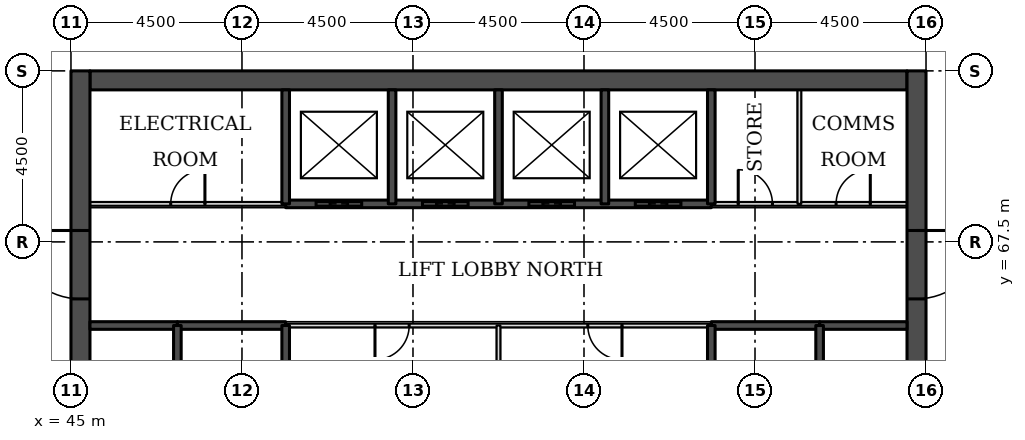
"""IFC4 building model, lengths in metres.
Left out: names, types, materials, properties, quantities, classifications, styles, units other than length and angle.
Written with IfcOpenShell. Run it as: python <this file> out.ifc"""

import sys

from ifc_helpers import new_model, si_unit, direction, frame, frame_2d, origin, place, context, subcontext, project, spatial, rectangle, extrude, element, fill, save


model = new_model("IFC4")
c1 = context("Model", 3, precision=1e-05, world=origin(), true_north=direction((0.0, 1.0)))
c2 = subcontext(c1, "Body", "Model", "MODEL_VIEW")
j1 = project(units=[si_unit("LENGTHUNIT", "METRE"), si_unit("PLANEANGLEUNIT", "RADIAN")], contexts=[c1])
p1 = place(None, origin())
s1 = spatial("IfcSite", under=j1, at=p1, CompositionType="ELEMENT")
p2 = place(p1, origin())
s2 = spatial("IfcBuilding", under=s1, at=p2, CompositionType="ELEMENT")
p3 = place(p2, frame((0.0, 0.0, -9.0)))
s3 = spatial("IfcBuildingStorey", under=s2, at=p3, CompositionType="ELEMENT", Elevation=-9.0)
p4 = place(p3, frame((45.5, 71.75, 0.0), z_axis=(0.0, 0.0, 1.0), x_axis=(1.0, 0.0, 0.0)))
e1 = element("IfcWall", 1, at=p4, inside=s3, PredefinedType="SHEAR", context=c2, shape_type="SweptSolid", body=[
    extrude(rectangle(XDim=21.5, YDim=0.5, at=frame_2d((10.75, 0.0))), origin(), (0.0, 0.0, 1.0), 4.5),
])
p5 = place(p3, frame((45.25, 49.5, 0.0), z_axis=(0.0, 0.0, 1.0), x_axis=(0.0, 1.0, 0.0)))
e2 = element("IfcWall", 2, at=p5, inside=s3, PredefinedType="SHEAR", context=c2, shape_type="SweptSolid", body=[
    extrude(rectangle(XDim=22.5, YDim=0.5, at=frame_2d((11.25, 0.0))), origin(), (0.0, 0.0, 1.0), 4.5),
])
p6 = place(p5, frame((4.2, 0.0, 0.0)))
e3 = element("IfcOpeningElement", 3, at=p6, cuts=e2, PredefinedType="OPENING", context=c2, shape_type="SweptSolid", body=[
    extrude(rectangle(XDim=1.8, YDim=2.1, at=frame_2d((0.9, 1.05))), frame((0.0, 0.26, 0.0), z_axis=(0.0, -1.0, 0.0), x_axis=(1.0, 0.0, 0.0)), (0.0, 0.0, 1.0), 0.52),
])
p7 = place(p5, frame((6.9, 0.0, 0.0)))
e4 = element("IfcOpeningElement", 4, at=p7, cuts=e2, PredefinedType="OPENING", context=c2, shape_type="SweptSolid", body=[
    extrude(rectangle(XDim=1.1, YDim=2.1, at=frame_2d((0.55, 1.05))), frame((0.0, 0.26, 0.0), z_axis=(0.0, -1.0, 0.0), x_axis=(1.0, 0.0, 0.0)), (0.0, 0.0, 1.0), 0.52),
])
p8 = place(p5, frame((13.6, 0.0, 0.0)))
e5 = element("IfcOpeningElement", 5, at=p8, cuts=e2, PredefinedType="OPENING", context=c2, shape_type="SweptSolid", body=[
    extrude(rectangle(XDim=1.1, YDim=2.1, at=frame_2d((0.55, 1.05))), frame((0.0, 0.26, 0.0), z_axis=(0.0, -1.0, 0.0), x_axis=(1.0, 0.0, 0.0)), (0.0, 0.0, 1.0), 0.52),
])
p9 = place(p5, frame((16.5, 0.0, 0.0)))
e6 = element("IfcOpeningElement", 6, at=p9, cuts=e2, PredefinedType="OPENING", context=c2, shape_type="SweptSolid", body=[
    extrude(rectangle(XDim=1.8, YDim=2.1, at=frame_2d((0.9, 1.05))), frame((0.0, 0.26, 0.0), z_axis=(0.0, -1.0, 0.0), x_axis=(1.0, 0.0, 0.0)), (0.0, 0.0, 1.0), 0.52),
])
p10 = place(p3, frame((67.25, 49.5, 0.0), z_axis=(0.0, 0.0, 1.0), x_axis=(0.0, 1.0, 0.0)))
e7 = element("IfcWall", 7, at=p10, inside=s3, PredefinedType="SHEAR", context=c2, shape_type="SweptSolid", body=[
    extrude(rectangle(XDim=22.5, YDim=0.5, at=frame_2d((11.25, 0.0))), origin(), (0.0, 0.0, 1.0), 4.5),
])
p11 = place(p10, frame((4.2, 0.0, 0.0)))
e8 = element("IfcOpeningElement", 8, at=p11, cuts=e7, PredefinedType="OPENING", context=c2, shape_type="SweptSolid", body=[
    extrude(rectangle(XDim=1.8, YDim=2.1, at=frame_2d((0.9, 1.05))), frame((0.0, 0.26, 0.0), z_axis=(0.0, -1.0, 0.0), x_axis=(1.0, 0.0, 0.0)), (0.0, 0.0, 1.0), 0.52),
])
p12 = place(p10, frame((6.9, 0.0, 0.0)))
e9 = element("IfcOpeningElement", 9, at=p12, cuts=e7, PredefinedType="OPENING", context=c2, shape_type="SweptSolid", body=[
    extrude(rectangle(XDim=1.1, YDim=2.1, at=frame_2d((0.55, 1.05))), frame((0.0, 0.26, 0.0), z_axis=(0.0, -1.0, 0.0), x_axis=(1.0, 0.0, 0.0)), (0.0, 0.0, 1.0), 0.52),
])
p13 = place(p10, frame((13.6, 0.0, 0.0)))
e10 = element("IfcOpeningElement", 10, at=p13, cuts=e7, PredefinedType="OPENING", context=c2, shape_type="SweptSolid", body=[
    extrude(rectangle(XDim=1.1, YDim=2.1, at=frame_2d((0.55, 1.05))), frame((0.0, 0.26, 0.0), z_axis=(0.0, -1.0, 0.0), x_axis=(1.0, 0.0, 0.0)), (0.0, 0.0, 1.0), 0.52),
])
p14 = place(p10, frame((16.5, 0.0, 0.0)))
e11 = element("IfcOpeningElement", 11, at=p14, cuts=e7, PredefinedType="OPENING", context=c2, shape_type="SweptSolid", body=[
    extrude(rectangle(XDim=1.8, YDim=2.1, at=frame_2d((0.9, 1.05))), frame((0.0, 0.26, 0.0), z_axis=(0.0, -1.0, 0.0), x_axis=(1.0, 0.0, 0.0)), (0.0, 0.0, 1.0), 0.52),
])
p15 = place(p3, frame((50.65, 65.3, 0.0), z_axis=(0.0, 0.0, 1.0), x_axis=(1.0, 0.0, 0.0)))
e12 = element("IfcWall", 12, at=p15, inside=s3, PredefinedType="PARTITIONING", context=c2, shape_type="SweptSolid", body=[
    extrude(rectangle(XDim=11.2, YDim=0.1, at=frame_2d((5.6, 0.0))), origin(), (0.0, 0.0, 1.0), 4.1),
])
p16 = place(p15, frame((2.35, 0.0, 0.0)))
e13 = element("IfcOpeningElement", 13, at=p16, cuts=e12, PredefinedType="OPENING", context=c2, shape_type="SweptSolid", body=[
    extrude(rectangle(XDim=0.9, YDim=2.1, at=frame_2d((0.45, 1.05))), frame((0.0, 0.06, 0.0), z_axis=(0.0, -1.0, 0.0), x_axis=(1.0, 0.0, 0.0)), (0.0, 0.0, 1.0), 0.12),
])
p17 = place(p15, frame((7.95, 0.0, 0.0)))
e14 = element("IfcOpeningElement", 14, at=p17, cuts=e12, PredefinedType="OPENING", context=c2, shape_type="SweptSolid", body=[
    extrude(rectangle(XDim=0.9, YDim=2.1, at=frame_2d((0.45, 1.05))), frame((0.0, 0.06, 0.0), z_axis=(0.0, -1.0, 0.0), x_axis=(1.0, 0.0, 0.0)), (0.0, 0.0, 1.0), 0.12),
])
for number, where, z_axis, x_axis in (
    (15, (45.5, 65.3, 0.0), (0.0, 0.0, 1.0), (1.0, 0.0, 0.0)),
    (16, (64.7, 65.3, 0.0), (0.0, 0.0, 1.0), (1.0, 0.0, 0.0)),
):
    element("IfcWall", number, at=place(p3, frame(where, z_axis=z_axis, x_axis=x_axis)), inside=s3, PredefinedType="SOLIDWALL", context=c2, shape_type="SweptSolid", body=[
        extrude(rectangle(XDim=2.3, YDim=0.2, at=frame_2d((1.15, 0.0))), origin(), (0.0, 0.0, 1.0), 4.1),
    ])
for number, where, z_axis, x_axis in (
    (17, (47.8, 65.3, 0.0), (0.0, 0.0, 1.0), (1.0, 0.0, 0.0)),
    (18, (61.85, 65.3, 0.0), (0.0, 0.0, 1.0), (1.0, 0.0, 0.0)),
):
    element("IfcWall", number, at=place(p3, frame(where, z_axis=z_axis, x_axis=x_axis)), inside=s3, PredefinedType="SOLIDWALL", context=c2, shape_type="SweptSolid", body=[
        extrude(rectangle(XDim=2.85, YDim=0.2, at=frame_2d((1.425, 0.0))), origin(), (0.0, 0.0, 1.0), 4.1),
    ])
p18 = place(p3, frame((45.5, 68.5, 0.0), z_axis=(0.0, 0.0, 1.0), x_axis=(1.0, 0.0, 0.0)))
e19 = element("IfcWall", 19, at=p18, inside=s3, PredefinedType="PARTITIONING", context=c2, shape_type="SweptSolid", body=[
    extrude(rectangle(XDim=5.15, YDim=0.1, at=frame_2d((2.575, 0.0))), origin(), (0.0, 0.0, 1.0), 4.1),
])
p19 = place(p18, frame((2.125, 0.0, 0.0)))
e20 = element("IfcOpeningElement", 20, at=p19, cuts=e19, PredefinedType="OPENING", context=c2, shape_type="SweptSolid", body=[
    extrude(rectangle(XDim=0.9, YDim=2.1, at=frame_2d((0.45, 1.05))), frame((0.0, 0.06, 0.0), z_axis=(0.0, -1.0, 0.0), x_axis=(1.0, 0.0, 0.0)), (0.0, 0.0, 1.0), 0.12),
])
p20 = place(p3, frame((61.85, 68.5, 0.0), z_axis=(0.0, 0.0, 1.0), x_axis=(1.0, 0.0, 0.0)))
e21 = element("IfcWall", 21, at=p20, inside=s3, PredefinedType="PARTITIONING", context=c2, shape_type="SweptSolid", body=[
    extrude(rectangle(XDim=5.15, YDim=0.1, at=frame_2d((2.575, 0.0))), origin(), (0.0, 0.0, 1.0), 4.1),
])
p21 = place(p20, frame((3.284, 0.0, 0.0)))
e22 = element("IfcOpeningElement", 22, at=p21, cuts=e21, PredefinedType="OPENING", context=c2, shape_type="SweptSolid", body=[
    extrude(rectangle(XDim=0.9, YDim=2.1, at=frame_2d((0.45, 1.05))), frame((0.0, 0.06, 0.0), z_axis=(0.0, -1.0, 0.0), x_axis=(1.0, 0.0, 0.0)), (0.0, 0.0, 1.0), 0.12),
])
p22 = place(p20, frame((0.709, 0.0, 0.0)))
e23 = element("IfcOpeningElement", 23, at=p22, cuts=e21, PredefinedType="OPENING", context=c2, shape_type="SweptSolid", body=[
    extrude(rectangle(XDim=0.9, YDim=2.1, at=frame_2d((0.45, 1.05))), frame((0.0, 0.06, 0.0), z_axis=(0.0, -1.0, 0.0), x_axis=(1.0, 0.0, 0.0)), (0.0, 0.0, 1.0), 0.12),
])
p23 = place(p3, frame((50.65, 68.5, 0.0), z_axis=(0.0, 0.0, 1.0), x_axis=(1.0, 0.0, 0.0)))
e24 = element("IfcWall", 24, at=p23, inside=s3, PredefinedType="SOLIDWALL", context=c2, shape_type="SweptSolid", body=[
    extrude(rectangle(XDim=11.2, YDim=0.2, at=frame_2d((5.6, 0.0))), origin(), (0.0, 0.0, 1.0), 4.1),
])
p24 = place(p23, frame((0.8, 0.0, 0.0)))
e25 = element("IfcOpeningElement", 25, at=p24, cuts=e24, PredefinedType="OPENING", context=c2, shape_type="SweptSolid", body=[
    extrude(rectangle(XDim=1.2, YDim=2.1, at=frame_2d((0.6, 1.05))), frame((0.0, 0.11, 0.0), z_axis=(0.0, -1.0, 0.0), x_axis=(1.0, 0.0, 0.0)), (0.0, 0.0, 1.0), 0.22),
])
p25 = place(p23, frame((3.6, 0.0, 0.0)))
e26 = element("IfcOpeningElement", 26, at=p25, cuts=e24, PredefinedType="OPENING", context=c2, shape_type="SweptSolid", body=[
    extrude(rectangle(XDim=1.2, YDim=2.1, at=frame_2d((0.6, 1.05))), frame((0.0, 0.11, 0.0), z_axis=(0.0, -1.0, 0.0), x_axis=(1.0, 0.0, 0.0)), (0.0, 0.0, 1.0), 0.22),
])
p26 = place(p23, frame((6.4, 0.0, 0.0)))
e27 = element("IfcOpeningElement", 27, at=p26, cuts=e24, PredefinedType="OPENING", context=c2, shape_type="SweptSolid", body=[
    extrude(rectangle(XDim=1.2, YDim=2.1, at=frame_2d((0.6, 1.05))), frame((0.0, 0.11, 0.0), z_axis=(0.0, -1.0, 0.0), x_axis=(1.0, 0.0, 0.0)), (0.0, 0.0, 1.0), 0.22),
])
p27 = place(p23, frame((9.2, 0.0, 0.0)))
e28 = element("IfcOpeningElement", 28, at=p27, cuts=e24, PredefinedType="OPENING", context=c2, shape_type="SweptSolid", body=[
    extrude(rectangle(XDim=1.2, YDim=2.1, at=frame_2d((0.6, 1.05))), frame((0.0, 0.11, 0.0), z_axis=(0.0, -1.0, 0.0), x_axis=(1.0, 0.0, 0.0)), (0.0, 0.0, 1.0), 0.22),
])
p28 = place(p3, frame((47.8, 62.0, 0.0), z_axis=(0.0, 0.0, 1.0), x_axis=(0.0, 1.0, 0.0)))
e29 = element("IfcWall", 29, at=p28, inside=s3, PredefinedType="SOLIDWALL", context=c2, shape_type="SweptSolid", body=[
    extrude(rectangle(XDim=3.3, YDim=0.2, at=frame_2d((1.65, 0.0))), origin(), (0.0, 0.0, 1.0), 4.1),
])
p29 = place(p28, frame((1.1, 0.0, 0.0)))
e30 = element("IfcOpeningElement", 30, at=p29, cuts=e29, PredefinedType="OPENING", context=c2, shape_type="SweptSolid", body=[
    extrude(rectangle(XDim=1.1, YDim=2.1, at=frame_2d((0.55, 1.05))), frame((0.0, 0.11, 0.0), z_axis=(0.0, -1.0, 0.0), x_axis=(1.0, 0.0, 0.0)), (0.0, 0.0, 1.0), 0.22),
])
p30 = place(p3, frame((50.65, 62.0, 0.0), z_axis=(0.0, 0.0, 1.0), x_axis=(0.0, 1.0, 0.0)))
e31 = element("IfcWall", 31, at=p30, inside=s3, PredefinedType="SOLIDWALL", context=c2, shape_type="SweptSolid", body=[
    extrude(rectangle(XDim=3.3, YDim=0.2, at=frame_2d((1.65, 0.0))), origin(), (0.0, 0.0, 1.0), 4.1),
])
for number, where, z_axis, x_axis in (
    (32, (50.65, 68.5, 0.0), (0.0, 0.0, 1.0), (0.0, 1.0, 0.0)),
    (33, (53.45, 68.5, 0.0), (0.0, 0.0, 1.0), (0.0, 1.0, 0.0)),
):
    element("IfcWall", number, at=place(p3, frame(where, z_axis=z_axis, x_axis=x_axis)), inside=s3, PredefinedType="SOLIDWALL", context=c2, shape_type="SweptSolid", body=[
        extrude(rectangle(XDim=3.0, YDim=0.2, at=frame_2d((1.5, 0.0))), origin(), (0.0, 0.0, 1.0), 4.1),
    ])
p31 = place(p3, frame((56.25, 62.5, 0.0), z_axis=(0.0, 0.0, 1.0), x_axis=(0.0, 1.0, 0.0)))
e34 = element("IfcWall", 34, at=p31, inside=s3, PredefinedType="PARTITIONING", context=c2, shape_type="SweptSolid", body=[
    extrude(rectangle(XDim=2.8, YDim=0.1, at=frame_2d((1.4, 0.0))), origin(), (0.0, 0.0, 1.0), 4.1),
])
for number, where, z_axis, x_axis in (
    (35, (56.25, 68.5, 0.0), (0.0, 0.0, 1.0), (0.0, 1.0, 0.0)),
    (36, (59.05, 68.5, 0.0), (0.0, 0.0, 1.0), (0.0, 1.0, 0.0)),
):
    element("IfcWall", number, at=place(p3, frame(where, z_axis=z_axis, x_axis=x_axis)), inside=s3, PredefinedType="SOLIDWALL", context=c2, shape_type="SweptSolid", body=[
        extrude(rectangle(XDim=3.0, YDim=0.2, at=frame_2d((1.5, 0.0))), origin(), (0.0, 0.0, 1.0), 4.1),
    ])
p32 = place(p3, frame((61.85, 62.0, 0.0), z_axis=(0.0, 0.0, 1.0), x_axis=(0.0, 1.0, 0.0)))
e37 = element("IfcWall", 37, at=p32, inside=s3, PredefinedType="SOLIDWALL", context=c2, shape_type="SweptSolid", body=[
    extrude(rectangle(XDim=3.3, YDim=0.2, at=frame_2d((1.65, 0.0))), origin(), (0.0, 0.0, 1.0), 4.1),
])
p33 = place(p3, frame((61.85, 68.5, 0.0), z_axis=(0.0, 0.0, 1.0), x_axis=(0.0, 1.0, 0.0)))
e38 = element("IfcWall", 38, at=p33, inside=s3, PredefinedType="SOLIDWALL", context=c2, shape_type="SweptSolid", body=[
    extrude(rectangle(XDim=3.0, YDim=0.2, at=frame_2d((1.5, 0.0))), origin(), (0.0, 0.0, 1.0), 4.1),
])
p34 = place(p3, frame((64.167, 68.5, 0.0), z_axis=(0.0, 0.0, 1.0), x_axis=(0.0, 1.0, 0.0)))
e39 = element("IfcWall", 39, at=p34, inside=s3, PredefinedType="PARTITIONING", context=c2, shape_type="SweptSolid", body=[
    extrude(rectangle(XDim=3.0, YDim=0.1, at=frame_2d((1.5, 0.0))), origin(), (0.0, 0.0, 1.0), 4.1),
])
p35 = place(p3, frame((64.7, 62.0, 0.0), z_axis=(0.0, 0.0, 1.0), x_axis=(0.0, 1.0, 0.0)))
e40 = element("IfcWall", 40, at=p35, inside=s3, PredefinedType="SOLIDWALL", context=c2, shape_type="SweptSolid", body=[
    extrude(rectangle(XDim=3.3, YDim=0.2, at=frame_2d((1.65, 0.0))), origin(), (0.0, 0.0, 1.0), 4.1),
])
p36 = place(p35, frame((1.1, 0.0, 0.0)))
e41 = element("IfcOpeningElement", 41, at=p36, cuts=e40, PredefinedType="OPENING", context=c2, shape_type="SweptSolid", body=[
    extrude(rectangle(XDim=1.1, YDim=2.1, at=frame_2d((0.55, 1.05))), frame((0.0, 0.11, 0.0), z_axis=(0.0, -1.0, 0.0), x_axis=(1.0, 0.0, 0.0)), (0.0, 0.0, 1.0), 0.22),
])
p37 = place(p24, origin())
e42 = element("IfcDoor", 42, at=p37, inside=s3, OperationType="DOUBLE_DOOR_SLIDING", PredefinedType="DOOR", context=c2, shape_type="SweptSolid", body=[
    extrude(rectangle(XDim=1.2, YDim=2.1, at=frame_2d((0.6, 1.05))), frame((0.0, 0.025, 0.0), z_axis=(0.0, -1.0, 0.0), x_axis=(1.0, 0.0, 0.0)), (0.0, 0.0, 1.0), 0.05),
])
fill(e25, e42)
p38 = place(p25, origin())
e43 = element("IfcDoor", 43, at=p38, inside=s3, OperationType="DOUBLE_DOOR_SLIDING", PredefinedType="DOOR", context=c2, shape_type="SweptSolid", body=[
    extrude(rectangle(XDim=1.2, YDim=2.1, at=frame_2d((0.6, 1.05))), frame((0.0, 0.025, 0.0), z_axis=(0.0, -1.0, 0.0), x_axis=(1.0, 0.0, 0.0)), (0.0, 0.0, 1.0), 0.05),
])
fill(e26, e43)
p39 = place(p26, origin())
e44 = element("IfcDoor", 44, at=p39, inside=s3, OperationType="DOUBLE_DOOR_SLIDING", PredefinedType="DOOR", context=c2, shape_type="SweptSolid", body=[
    extrude(rectangle(XDim=1.2, YDim=2.1, at=frame_2d((0.6, 1.05))), frame((0.0, 0.025, 0.0), z_axis=(0.0, -1.0, 0.0), x_axis=(1.0, 0.0, 0.0)), (0.0, 0.0, 1.0), 0.05),
])
fill(e27, e44)
p40 = place(p27, origin())
e45 = element("IfcDoor", 45, at=p40, inside=s3, OperationType="DOUBLE_DOOR_SLIDING", PredefinedType="DOOR", context=c2, shape_type="SweptSolid", body=[
    extrude(rectangle(XDim=1.2, YDim=2.1, at=frame_2d((0.6, 1.05))), frame((0.0, 0.025, 0.0), z_axis=(0.0, -1.0, 0.0), x_axis=(1.0, 0.0, 0.0)), (0.0, 0.0, 1.0), 0.05),
])
fill(e28, e45)
p41 = place(p9, origin())
e46 = element("IfcDoor", 46, at=p41, inside=s3, OperationType="SINGLE_SWING_RIGHT", PredefinedType="DOOR", context=c2, shape_type="SweptSolid", body=[
    extrude(rectangle(XDim=1.8, YDim=2.1, at=frame_2d((0.9, 1.05))), frame((0.0, 0.025, 0.0), z_axis=(0.0, -1.0, 0.0), x_axis=(1.0, 0.0, 0.0)), (0.0, 0.0, 1.0), 0.05),
])
fill(e6, e46)
p42 = place(p14, frame((1.8, 0.0, 0.0), z_axis=(0.0, 0.0, 1.0), x_axis=(-1.0, 0.0, 0.0)))
e47 = element("IfcDoor", 47, at=p42, inside=s3, OperationType="SINGLE_SWING_LEFT", PredefinedType="DOOR", context=c2, shape_type="SweptSolid", body=[
    extrude(rectangle(XDim=1.8, YDim=2.1, at=frame_2d((0.9, 1.05))), frame((0.0, 0.025, 0.0), z_axis=(0.0, -1.0, 0.0), x_axis=(1.0, 0.0, 0.0)), (0.0, 0.0, 1.0), 0.05),
])
fill(e11, e47)
p43 = place(p21, origin())
e48 = element("IfcDoor", 48, at=p43, inside=s3, OperationType="SINGLE_SWING_RIGHT", PredefinedType="DOOR", context=c2, shape_type="SweptSolid", body=[
    extrude(rectangle(XDim=0.9, YDim=2.1, at=frame_2d((0.45, 1.05))), frame((0.0, 0.025, 0.0), z_axis=(0.0, -1.0, 0.0), x_axis=(1.0, 0.0, 0.0)), (0.0, 0.0, 1.0), 0.05),
])
fill(e22, e48)
p44 = place(p22, origin())
e49 = element("IfcDoor", 49, at=p44, inside=s3, OperationType="SINGLE_SWING_LEFT", PredefinedType="DOOR", context=c2, shape_type="SweptSolid", body=[
    extrude(rectangle(XDim=0.9, YDim=2.1, at=frame_2d((0.45, 1.05))), frame((0.0, 0.025, 0.0), z_axis=(0.0, -1.0, 0.0), x_axis=(1.0, 0.0, 0.0)), (0.0, 0.0, 1.0), 0.05),
])
fill(e23, e49)
p45 = place(p19, origin())
e50 = element("IfcDoor", 50, at=p45, inside=s3, OperationType="SINGLE_SWING_RIGHT", PredefinedType="DOOR", context=c2, shape_type="SweptSolid", body=[
    extrude(rectangle(XDim=0.9, YDim=2.1, at=frame_2d((0.45, 1.05))), frame((0.0, 0.025, 0.0), z_axis=(0.0, -1.0, 0.0), x_axis=(1.0, 0.0, 0.0)), (0.0, 0.0, 1.0), 0.05),
])
fill(e20, e50)
p46 = place(p16, frame((0.9, 0.0, 0.0), z_axis=(0.0, 0.0, 1.0), x_axis=(-1.0, 0.0, 0.0)))
e51 = element("IfcDoor", 51, at=p46, inside=s3, OperationType="SINGLE_SWING_RIGHT", PredefinedType="DOOR", context=c2, shape_type="SweptSolid", body=[
    extrude(rectangle(XDim=0.9, YDim=2.1, at=frame_2d((0.45, 1.05))), frame((0.0, 0.025, 0.0), z_axis=(0.0, -1.0, 0.0), x_axis=(1.0, 0.0, 0.0)), (0.0, 0.0, 1.0), 0.05),
])
fill(e13, e51)
p47 = place(p17, frame((0.9, 0.0, 0.0), z_axis=(0.0, 0.0, 1.0), x_axis=(-1.0, 0.0, 0.0)))
e52 = element("IfcDoor", 52, at=p47, inside=s3, OperationType="SINGLE_SWING_LEFT", PredefinedType="DOOR", context=c2, shape_type="SweptSolid", body=[
    extrude(rectangle(XDim=0.9, YDim=2.1, at=frame_2d((0.45, 1.05))), frame((0.0, 0.025, 0.0), z_axis=(0.0, -1.0, 0.0), x_axis=(1.0, 0.0, 0.0)), (0.0, 0.0, 1.0), 0.05),
])
fill(e14, e52)
save(model, sys.argv[1])
